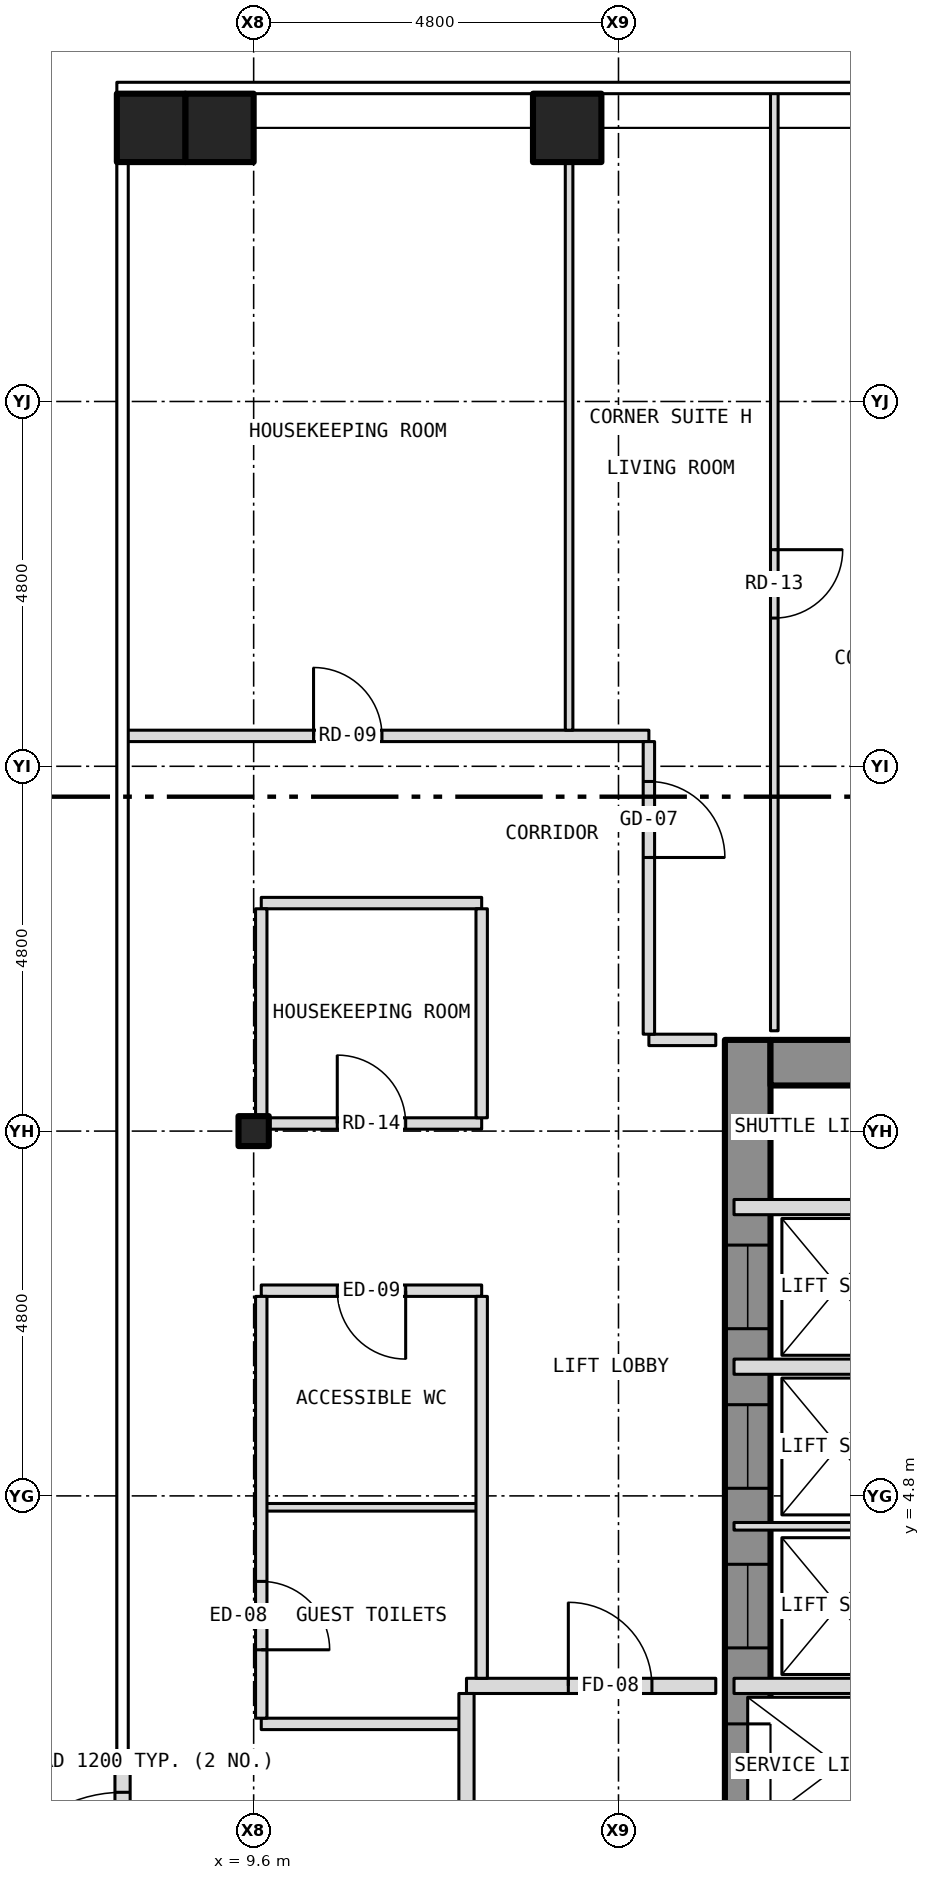
"""IFC4 building model, lengths in metres.
Left out: names, types, materials, properties, quantities, classifications, styles, units other than length and angle.
Written with IfcOpenShell. Run it as: python <this file> out.ifc"""

import sys

from ifc_helpers import new_model, si_unit, direction, frame, frame_2d, origin, origin_2d, place, context, subcontext, project, spatial, rectangle, hollow_rectangle, i_section, extrude, element, fill, save


model = new_model("IFC4")
c1 = context("Model", 3, precision=1e-05, world=origin(), true_north=direction((0.0, 1.0)))
c2 = subcontext(c1, "Body", "Model", "MODEL_VIEW")
j1 = project(units=[si_unit("LENGTHUNIT", "METRE"), si_unit("PLANEANGLEUNIT", "RADIAN")], contexts=[c1])
p1 = place(None, origin())
s1 = spatial("IfcSite", under=j1, at=p1, CompositionType="ELEMENT")
p2 = place(p1, origin())
s2 = spatial("IfcBuilding", under=s1, at=p2, CompositionType="ELEMENT")
p3 = place(p2, frame((0.0, 0.0, 131.0)))
s3 = spatial("IfcBuildingStorey", under=s2, at=p3, CompositionType="ELEMENT", Elevation=131.0)
for number, where, z_axis, x_axis in (
    (1, (9.15, 22.8, -0.15), (0.0, 0.0, 1.0), (1.0, 0.0, 0.0)),
    (2, (13.725, 22.8, -0.15), (0.0, 0.0, 1.0), (1.0, 0.0, 0.0)),
    (3, (8.25, 22.8, -0.15), (0.0, 0.0, 1.0), (1.0, 0.0, 0.0)),
):
    element("IfcColumn", number, at=place(p3, frame(where, z_axis=z_axis, x_axis=x_axis)), inside=s3, PredefinedType="COLUMN", context=c2, shape_type="SweptSolid", body=[
        extrude(hollow_rectangle(XDim=0.9, YDim=0.9, WallThickness=0.05, at=origin_2d()), origin(), (0.0, 0.0, 1.0), 3.5),
    ])
p4 = place(p3, frame((9.6, 9.6, -0.15), z_axis=(0.0, 0.0, 1.0), x_axis=(1.0, 0.0, 0.0)))
e4 = element("IfcColumn", 4, at=p4, inside=s3, PredefinedType="COLUMN", context=c2, shape_type="SweptSolid", body=[
    extrude(i_section(OverallWidth=0.399, OverallDepth=0.394, WebThickness=0.023, FlangeThickness=0.037, at=origin_2d()), origin(), (0.0, 0.0, 1.0), 3.5),
])
p5 = place(p3, frame((16.1, -10.8, 0.0), z_axis=(0.0, 0.0, 1.0), x_axis=(0.0, 1.0, 0.0)))
e5 = element("IfcWall", 5, at=p5, inside=s3, PredefinedType="SHEAR", context=c2, shape_type="SweptSolid", body=[
    extrude(rectangle(XDim=21.6, YDim=0.6, at=frame_2d((10.8, 0.0))), origin(), (0.0, 0.0, 1.0), 3.25),
])
p6 = place(p5, frame((9.4, 0.0, 0.0)))
e6 = element("IfcOpeningElement", 6, at=p6, cuts=e5, PredefinedType="OPENING", context=c2, shape_type="SweptSolid", body=[
    extrude(rectangle(XDim=1.1, YDim=2.1, at=frame_2d((0.55, 1.05))), frame((0.0, 0.312, 0.0), z_axis=(0.0, -1.0, 0.0), x_axis=(1.0, 0.0, 0.0)), (0.0, 0.0, 1.0), 0.624),
])
p7 = place(p5, frame((11.5, 0.0, 0.0)))
e7 = element("IfcOpeningElement", 7, at=p7, cuts=e5, PredefinedType="OPENING", context=c2, shape_type="SweptSolid", body=[
    extrude(rectangle(XDim=1.1, YDim=2.1, at=frame_2d((0.55, 1.05))), frame((0.0, 0.312, 0.0), z_axis=(0.0, -1.0, 0.0), x_axis=(1.0, 0.0, 0.0)), (0.0, 0.0, 1.0), 0.624),
])
p8 = place(p5, frame((13.6, 0.0, 0.0)))
e8 = element("IfcOpeningElement", 8, at=p8, cuts=e5, PredefinedType="OPENING", context=c2, shape_type="SweptSolid", body=[
    extrude(rectangle(XDim=1.1, YDim=2.1, at=frame_2d((0.55, 1.05))), frame((0.0, 0.312, 0.0), z_axis=(0.0, -1.0, 0.0), x_axis=(1.0, 0.0, 0.0)), (0.0, 0.0, 1.0), 0.624),
])
p9 = place(p5, frame((15.7, 0.0, 0.0)))
e9 = element("IfcOpeningElement", 9, at=p9, cuts=e5, PredefinedType="OPENING", context=c2, shape_type="SweptSolid", body=[
    extrude(rectangle(XDim=1.1, YDim=2.1, at=frame_2d((0.55, 1.05))), frame((0.0, 0.312, 0.0), z_axis=(0.0, -1.0, 0.0), x_axis=(1.0, 0.0, 0.0)), (0.0, 0.0, 1.0), 0.624),
])
p10 = place(p5, frame((17.8, 0.0, 0.0)))
e10 = element("IfcOpeningElement", 10, at=p10, cuts=e5, PredefinedType="OPENING", context=c2, shape_type="SweptSolid", body=[
    extrude(rectangle(XDim=1.1, YDim=2.1, at=frame_2d((0.55, 1.05))), frame((0.0, 0.312, 0.0), z_axis=(0.0, -1.0, 0.0), x_axis=(1.0, 0.0, 0.0)), (0.0, 0.0, 1.0), 0.624),
])
p11 = place(p5, frame((5.642, 0.0, 0.0)))
e11 = element("IfcOpeningElement", 11, at=p11, cuts=e5, PredefinedType="OPENING", context=c2, shape_type="SweptSolid", body=[
    extrude(rectangle(XDim=1.1, YDim=2.1, at=frame_2d((0.55, 1.05))), frame((0.0, 0.312, 0.0), z_axis=(0.0, -1.0, 0.0), x_axis=(1.0, 0.0, 0.0)), (0.0, 0.0, 1.0), 0.624),
])
p12 = place(p5, frame((7.5, 0.0, 0.0)))
e12 = element("IfcOpeningElement", 12, at=p12, cuts=e5, PredefinedType="OPENING", context=c2, shape_type="SweptSolid", body=[
    extrude(rectangle(XDim=1.1, YDim=2.1, at=frame_2d((0.55, 1.05))), frame((0.0, 0.312, 0.0), z_axis=(0.0, -1.0, 0.0), x_axis=(1.0, 0.0, 0.0)), (0.0, 0.0, 1.0), 0.624),
])
p13 = place(p3, frame((16.4, 10.5, 0.0), z_axis=(0.0, 0.0, 1.0), x_axis=(1.0, 0.0, 0.0)))
e13 = element("IfcWall", 13, at=p13, inside=s3, PredefinedType="SHEAR", context=c2, shape_type="SweptSolid", body=[
    extrude(rectangle(XDim=5.8, YDim=0.6, at=frame_2d((2.9, 0.0))), origin(), (0.0, 0.0, 1.0), 3.25),
])
p14 = place(p3, frame((7.875, -1.4, 0.0), z_axis=(0.0, 0.0, 1.0), x_axis=(0.0, 1.0, 0.0)))
e14 = element("IfcWall", 14, at=p14, inside=s3, PredefinedType="SOLIDWALL", context=c2, shape_type="SweptSolid", body=[
    extrude(rectangle(XDim=2.8, YDim=0.2, at=frame_2d((1.4, 0.0))), origin(), (0.0, 0.0, 1.0), 3.5),
])
p15 = place(p14, frame((0.5, 0.0, 0.0)))
e15 = element("IfcOpeningElement", 15, at=p15, cuts=e14, PredefinedType="OPENING", context=c2, shape_type="SweptSolid", body=[
    extrude(rectangle(XDim=1.8, YDim=2.1, at=frame_2d((0.9, 1.05))), frame((0.0, 0.112, 0.0), z_axis=(0.0, -1.0, 0.0), x_axis=(1.0, 0.0, 0.0)), (0.0, 0.0, 1.0), 0.224),
])
p16 = place(p3, frame((9.7, 1.8, 0.0), z_axis=(0.0, 0.0, 1.0), x_axis=(1.0, 0.0, 0.0)))
e16 = element("IfcWall", 16, at=p16, inside=s3, PredefinedType="PARTITIONING", context=c2, shape_type="SweptSolid", body=[
    extrude(rectangle(XDim=2.7, YDim=0.15, at=frame_2d((1.35, 0.0))), origin(), (0.0, 0.0, 1.0), 3.35),
])
p17 = place(p3, frame((12.4, 2.3, 0.0), z_axis=(0.0, 0.0, 1.0), x_axis=(1.0, 0.0, 0.0)))
e17 = element("IfcWall", 17, at=p17, inside=s3, PredefinedType="PARTITIONING", context=c2, shape_type="SweptSolid", body=[
    extrude(rectangle(XDim=3.28, YDim=0.2, at=frame_2d((1.64, 0.0))), origin(), (0.0, 0.0, 1.0), 3.35),
])
p18 = place(p17, frame((1.34, 0.0, 0.0)))
e18 = element("IfcOpeningElement", 18, at=p18, cuts=e17, PredefinedType="OPENING", context=c2, shape_type="SweptSolid", body=[
    extrude(rectangle(XDim=1.1, YDim=2.1, at=frame_2d((0.55, 1.05))), frame((0.0, 0.112, 0.0), z_axis=(0.0, -1.0, 0.0), x_axis=(1.0, 0.0, 0.0)), (0.0, 0.0, 1.0), 0.224),
])
p19 = place(p3, frame((15.92, 2.3, 0.0), z_axis=(0.0, 0.0, 1.0), x_axis=(1.0, 0.0, 0.0)))
e19 = element("IfcWall", 19, at=p19, inside=s3, PredefinedType="PARTITIONING", context=c2, shape_type="SweptSolid", body=[
    extrude(rectangle(XDim=2.88, YDim=0.2, at=frame_2d((1.44, 0.0))), origin(), (0.0, 0.0, 1.0), 3.25),
])
p20 = place(p3, frame((15.92, 4.4, 0.0), z_axis=(0.0, 0.0, 1.0), x_axis=(1.0, 0.0, 0.0)))
e20 = element("IfcWall", 20, at=p20, inside=s3, PredefinedType="PARTITIONING", context=c2, shape_type="SweptSolid", body=[
    extrude(rectangle(XDim=6.76, YDim=0.1, at=frame_2d((3.38, 0.0))), origin(), (0.0, 0.0, 1.0), 3.25),
])
p21 = place(p20, frame((4.43, 0.0, 0.0)))
e21 = element("IfcOpeningElement", 21, at=p21, cuts=e20, PredefinedType="OPENING", context=c2, shape_type="SweptSolid", body=[
    extrude(rectangle(XDim=0.9, YDim=2.1, at=frame_2d((0.45, 1.05))), frame((0.0, 0.062, 0.0), z_axis=(0.0, -1.0, 0.0), x_axis=(1.0, 0.0, 0.0)), (0.0, 0.0, 1.0), 0.124),
])
p22 = place(p3, frame((9.7, 4.65, 0.0), z_axis=(0.0, 0.0, 1.0), x_axis=(1.0, 0.0, 0.0)))
e22 = element("IfcWall", 22, at=p22, inside=s3, PredefinedType="PARTITIONING", context=c2, shape_type="SweptSolid", body=[
    extrude(rectangle(XDim=2.9, YDim=0.1, at=frame_2d((1.45, 0.0))), origin(), (0.0, 0.0, 1.0), 3.35),
])
p23 = place(p3, frame((15.92, 6.5, 0.0), z_axis=(0.0, 0.0, 1.0), x_axis=(1.0, 0.0, 0.0)))
e23 = element("IfcWall", 23, at=p23, inside=s3, PredefinedType="PARTITIONING", context=c2, shape_type="SweptSolid", body=[
    extrude(rectangle(XDim=2.88, YDim=0.2, at=frame_2d((1.44, 0.0))), origin(), (0.0, 0.0, 1.0), 3.25),
])
p24 = place(p3, frame((9.7, 7.5, 0.0), z_axis=(0.0, 0.0, 1.0), x_axis=(1.0, 0.0, 0.0)))
e24 = element("IfcWall", 24, at=p24, inside=s3, PredefinedType="PARTITIONING", context=c2, shape_type="SweptSolid", body=[
    extrude(rectangle(XDim=2.9, YDim=0.15, at=frame_2d((1.45, 0.0))), origin(), (0.0, 0.0, 1.0), 3.35),
])
p25 = place(p24, frame((1.0, 0.0, 0.0)))
e25 = element("IfcOpeningElement", 25, at=p25, cuts=e24, PredefinedType="OPENING", context=c2, shape_type="SweptSolid", body=[
    extrude(rectangle(XDim=0.9, YDim=2.1, at=frame_2d((0.45, 1.05))), frame((0.0, 0.087, 0.0), z_axis=(0.0, -1.0, 0.0), x_axis=(1.0, 0.0, 0.0)), (0.0, 0.0, 1.0), 0.174),
])
p26 = place(p3, frame((15.92, 8.6, 0.0), z_axis=(0.0, 0.0, 1.0), x_axis=(1.0, 0.0, 0.0)))
e26 = element("IfcWall", 26, at=p26, inside=s3, PredefinedType="PARTITIONING", context=c2, shape_type="SweptSolid", body=[
    extrude(rectangle(XDim=2.88, YDim=0.2, at=frame_2d((1.44, 0.0))), origin(), (0.0, 0.0, 1.0), 3.25),
])
p27 = place(p3, frame((9.7, 9.7, 0.0), z_axis=(0.0, 0.0, 1.0), x_axis=(1.0, 0.0, 0.0)))
e27 = element("IfcWall", 27, at=p27, inside=s3, PredefinedType="PARTITIONING", context=c2, shape_type="SweptSolid", body=[
    extrude(rectangle(XDim=2.9, YDim=0.15, at=frame_2d((1.45, 0.0))), origin(), (0.0, 0.0, 1.0), 2.728),
])
p28 = place(p27, frame((1.0, 0.0, 0.0)))
e28 = element("IfcOpeningElement", 28, at=p28, cuts=e27, PredefinedType="OPENING", context=c2, shape_type="SweptSolid", body=[
    extrude(rectangle(XDim=0.9, YDim=2.1, at=frame_2d((0.45, 1.05))), frame((0.0, 0.087, 0.0), z_axis=(0.0, -1.0, 0.0), x_axis=(1.0, 0.0, 0.0)), (0.0, 0.0, 1.0), 0.174),
])
p29 = place(p3, frame((14.8, 10.8, 0.0), z_axis=(0.0, 0.0, 1.0), x_axis=(1.0, 0.0, 0.0)))
e29 = element("IfcWall", 29, at=p29, inside=s3, PredefinedType="PARTITIONING", context=c2, shape_type="SweptSolid", body=[
    extrude(rectangle(XDim=0.88, YDim=0.15, at=frame_2d((0.44, 0.0))), origin(), (0.0, 0.0, 1.0), 3.35),
])
p30 = place(p3, frame((9.7, 12.6, 0.0), z_axis=(0.0, 0.0, 1.0), x_axis=(1.0, 0.0, 0.0)))
e30 = element("IfcWall", 30, at=p30, inside=s3, PredefinedType="PARTITIONING", context=c2, shape_type="SweptSolid", body=[
    extrude(rectangle(XDim=2.9, YDim=0.15, at=frame_2d((1.45, 0.0))), origin(), (0.0, 0.0, 1.0), 3.35),
])
p31 = place(p3, frame((7.92, 14.8, 0.0), z_axis=(0.0, 0.0, 1.0), x_axis=(1.0, 0.0, 0.0)))
e31 = element("IfcWall", 31, at=p31, inside=s3, PredefinedType="PARTITIONING", context=c2, shape_type="SweptSolid", body=[
    extrude(rectangle(XDim=6.88, YDim=0.15, at=frame_2d((3.44, 0.0))), origin(), (0.0, 0.0, 1.0), 3.35),
])
p32 = place(p31, frame((2.468, 0.0, 0.0)))
e32 = element("IfcOpeningElement", 32, at=p32, cuts=e31, PredefinedType="OPENING", context=c2, shape_type="SweptSolid", body=[
    extrude(rectangle(XDim=0.9, YDim=2.1, at=frame_2d((0.45, 1.05))), frame((0.0, 0.087, 0.0), z_axis=(0.0, -1.0, 0.0), x_axis=(1.0, 0.0, 0.0)), (0.0, 0.0, 1.0), 0.174),
])
p33 = place(p3, frame((9.7, 1.875, 0.0), z_axis=(0.0, 0.0, 1.0), x_axis=(0.0, 1.0, 0.0)))
e33 = element("IfcWall", 33, at=p33, inside=s3, PredefinedType="PARTITIONING", context=c2, shape_type="SweptSolid", body=[
    extrude(rectangle(XDim=5.55, YDim=0.15, at=frame_2d((2.775, 0.0))), origin(), (0.0, 0.0, 1.0), 2.728),
])
p34 = place(p33, frame((0.9, 0.0, 0.0)))
e34 = element("IfcOpeningElement", 34, at=p34, cuts=e33, PredefinedType="OPENING", context=c2, shape_type="SweptSolid", body=[
    extrude(rectangle(XDim=0.9, YDim=2.1, at=frame_2d((0.45, 1.05))), frame((0.0, 0.087, 0.0), z_axis=(0.0, -1.0, 0.0), x_axis=(1.0, 0.0, 0.0)), (0.0, 0.0, 1.0), 0.174),
])
p35 = place(p3, frame((9.7, 9.775, 0.0), z_axis=(0.0, 0.0, 1.0), x_axis=(0.0, 1.0, 0.0)))
e35 = element("IfcWall", 35, at=p35, inside=s3, PredefinedType="PARTITIONING", context=c2, shape_type="SweptSolid", body=[
    extrude(rectangle(XDim=2.75, YDim=0.15, at=frame_2d((1.375, 0.0))), origin(), (0.0, 0.0, 1.0), 2.728),
])
p36 = place(p3, frame((12.4, -1.8, 0.0), z_axis=(0.0, 0.0, 1.0), x_axis=(0.0, 1.0, 0.0)))
e36 = element("IfcWall", 36, at=p36, inside=s3, PredefinedType="PARTITIONING", context=c2, shape_type="SweptSolid", body=[
    extrude(rectangle(XDim=4.0, YDim=0.2, at=frame_2d((2.0, 0.0))), origin(), (0.0, 0.0, 1.0), 3.35),
])
p37 = place(p36, frame((1.25, 0.0, 0.0)))
e37 = element("IfcOpeningElement", 37, at=p37, cuts=e36, PredefinedType="OPENING", context=c2, shape_type="SweptSolid", body=[
    extrude(rectangle(XDim=1.1, YDim=2.1, at=frame_2d((0.55, 1.05))), frame((0.0, 0.112, 0.0), z_axis=(0.0, -1.0, 0.0), x_axis=(1.0, 0.0, 0.0)), (0.0, 0.0, 1.0), 0.224),
])
p38 = place(p3, frame((12.6, 2.4, 0.0), z_axis=(0.0, 0.0, 1.0), x_axis=(0.0, 1.0, 0.0)))
e38 = element("IfcWall", 38, at=p38, inside=s3, PredefinedType="PARTITIONING", context=c2, shape_type="SweptSolid", body=[
    extrude(rectangle(XDim=5.025, YDim=0.15, at=frame_2d((2.513, 0.0))), origin(), (0.0, 0.0, 1.0), 3.35),
])
p39 = place(p3, frame((12.6, 9.775, 0.0), z_axis=(0.0, 0.0, 1.0), x_axis=(0.0, 1.0, 0.0)))
e39 = element("IfcWall", 39, at=p39, inside=s3, PredefinedType="PARTITIONING", context=c2, shape_type="SweptSolid", body=[
    extrude(rectangle(XDim=2.75, YDim=0.15, at=frame_2d((1.375, 0.0))), origin(), (0.0, 0.0, 1.0), 3.35),
])
p40 = place(p3, frame((13.75, 14.875, 0.0), z_axis=(0.0, 0.0, 1.0), x_axis=(0.0, 1.0, 0.0)))
e40 = element("IfcWall", 40, at=p40, inside=s3, PredefinedType="PARTITIONING", context=c2, shape_type="SweptSolid", body=[
    extrude(rectangle(XDim=7.805, YDim=0.1, at=frame_2d((3.902, 0.0))), origin(), (0.0, 0.0, 1.0), 3.35),
])
p41 = place(p3, frame((14.8, 10.875, 0.0), z_axis=(0.0, 0.0, 1.0), x_axis=(0.0, 1.0, 0.0)))
e41 = element("IfcWall", 41, at=p41, inside=s3, PredefinedType="PARTITIONING", context=c2, shape_type="SweptSolid", body=[
    extrude(rectangle(XDim=3.85, YDim=0.15, at=frame_2d((1.925, 0.0))), origin(), (0.0, 0.0, 1.0), 3.35),
])
p42 = place(p41, frame((2.325, 0.0, 0.0)))
e42 = element("IfcOpeningElement", 42, at=p42, cuts=e41, PredefinedType="OPENING", context=c2, shape_type="SweptSolid", body=[
    extrude(rectangle(XDim=1.0, YDim=2.1, at=frame_2d((0.5, 1.05))), frame((0.0, 0.087, 0.0), z_axis=(0.0, -1.0, 0.0), x_axis=(1.0, 0.0, 0.0)), (0.0, 0.0, 1.0), 0.174),
])
p43 = place(p3, frame((16.45, 10.92, 0.0), z_axis=(0.0, 0.0, 1.0), x_axis=(0.0, 1.0, 0.0)))
e43 = element("IfcWall", 43, at=p43, inside=s3, PredefinedType="PARTITIONING", context=c2, shape_type="SweptSolid", body=[
    extrude(rectangle(XDim=12.36, YDim=0.1, at=frame_2d((6.18, 0.0))), origin(), (0.0, 0.0, 1.0), 3.35),
])
p44 = place(p43, frame((5.43, 0.0, 0.0)))
e44 = element("IfcOpeningElement", 44, at=p44, cuts=e43, PredefinedType="OPENING", context=c2, shape_type="SweptSolid", body=[
    extrude(rectangle(XDim=0.9, YDim=2.1, at=frame_2d((0.45, 1.05))), frame((0.0, 0.062, 0.0), z_axis=(0.0, -1.0, 0.0), x_axis=(1.0, 0.0, 0.0)), (0.0, 0.0, 1.0), 0.124),
])
p45 = place(p15, origin())
e45 = element("IfcDoor", 45, at=p45, inside=s3, OperationType="DOUBLE_DOOR_DOUBLE_SWING", PredefinedType="DOOR", context=c2, shape_type="SweptSolid", body=[
    extrude(rectangle(XDim=1.8, YDim=2.1, at=frame_2d((0.9, 1.05))), frame((0.0, 0.025, 0.0), z_axis=(0.0, -1.0, 0.0), x_axis=(1.0, 0.0, 0.0)), (0.0, 0.0, 1.0), 0.05),
])
fill(e15, e45)
p46 = place(p7, origin())
e46 = element("IfcDoor", 46, at=p46, inside=s3, OperationType="SLIDING_TO_LEFT", PredefinedType="DOOR", context=c2, shape_type="SweptSolid", body=[
    extrude(rectangle(XDim=1.1, YDim=2.1, at=frame_2d((0.55, 1.05))), frame((0.0, 0.025, 0.0), z_axis=(0.0, -1.0, 0.0), x_axis=(1.0, 0.0, 0.0)), (0.0, 0.0, 1.0), 0.05),
])
fill(e7, e46)
p47 = place(p8, origin())
e47 = element("IfcDoor", 47, at=p47, inside=s3, OperationType="SLIDING_TO_LEFT", PredefinedType="DOOR", context=c2, shape_type="SweptSolid", body=[
    extrude(rectangle(XDim=1.1, YDim=2.1, at=frame_2d((0.55, 1.05))), frame((0.0, 0.025, 0.0), z_axis=(0.0, -1.0, 0.0), x_axis=(1.0, 0.0, 0.0)), (0.0, 0.0, 1.0), 0.05),
])
fill(e8, e47)
p48 = place(p9, origin())
e48 = element("IfcDoor", 48, at=p48, inside=s3, OperationType="SLIDING_TO_LEFT", PredefinedType="DOOR", context=c2, shape_type="SweptSolid", body=[
    extrude(rectangle(XDim=1.1, YDim=2.1, at=frame_2d((0.55, 1.05))), frame((0.0, 0.025, 0.0), z_axis=(0.0, -1.0, 0.0), x_axis=(1.0, 0.0, 0.0)), (0.0, 0.0, 1.0), 0.05),
])
fill(e9, e48)
p49 = place(p10, origin())
e49 = element("IfcDoor", 49, at=p49, inside=s3, OperationType="SLIDING_TO_LEFT", PredefinedType="DOOR", context=c2, shape_type="SweptSolid", body=[
    extrude(rectangle(XDim=1.1, YDim=2.1, at=frame_2d((0.55, 1.05))), frame((0.0, 0.025, 0.0), z_axis=(0.0, -1.0, 0.0), x_axis=(1.0, 0.0, 0.0)), (0.0, 0.0, 1.0), 0.05),
])
fill(e10, e49)
p50 = place(p18, origin())
e50 = element("IfcDoor", 50, at=p50, inside=s3, OperationType="SINGLE_SWING_LEFT", PredefinedType="DOOR", context=c2, shape_type="SweptSolid", body=[
    extrude(rectangle(XDim=1.1, YDim=2.1, at=frame_2d((0.55, 1.05))), frame((0.0, 0.025, 0.0), z_axis=(0.0, -1.0, 0.0), x_axis=(1.0, 0.0, 0.0)), (0.0, 0.0, 1.0), 0.05),
])
fill(e18, e50)
p51 = place(p32, origin())
e51 = element("IfcDoor", 51, at=p51, inside=s3, OperationType="SINGLE_SWING_LEFT", PredefinedType="DOOR", context=c2, shape_type="SweptSolid", body=[
    extrude(rectangle(XDim=0.9, YDim=2.1, at=frame_2d((0.45, 1.05))), frame((0.0, 0.025, 0.0), z_axis=(0.0, -1.0, 0.0), x_axis=(1.0, 0.0, 0.0)), (0.0, 0.0, 1.0), 0.05),
])
fill(e32, e51)
p52 = place(p42, origin())
e52 = element("IfcDoor", 52, at=p52, inside=s3, OperationType="SINGLE_SWING_LEFT", PredefinedType="DOOR", context=c2, shape_type="SweptSolid", body=[
    extrude(rectangle(XDim=1.0, YDim=2.1, at=frame_2d((0.5, 1.05))), frame((0.0, 0.025, 0.0), z_axis=(0.0, -1.0, 0.0), x_axis=(1.0, 0.0, 0.0)), (0.0, 0.0, 1.0), 0.05),
])
fill(e42, e52)
p53 = place(p44, origin())
e53 = element("IfcDoor", 53, at=p53, inside=s3, OperationType="SINGLE_SWING_RIGHT", PredefinedType="DOOR", context=c2, shape_type="SweptSolid", body=[
    extrude(rectangle(XDim=0.9, YDim=2.1, at=frame_2d((0.45, 1.05))), frame((0.0, 0.025, 0.0), z_axis=(0.0, -1.0, 0.0), x_axis=(1.0, 0.0, 0.0)), (0.0, 0.0, 1.0), 0.05),
])
fill(e44, e53)
p54 = place(p28, origin())
e54 = element("IfcDoor", 54, at=p54, inside=s3, OperationType="SINGLE_SWING_LEFT", PredefinedType="DOOR", context=c2, shape_type="SweptSolid", body=[
    extrude(rectangle(XDim=0.9, YDim=2.1, at=frame_2d((0.45, 1.05))), frame((0.0, 0.025, 0.0), z_axis=(0.0, -1.0, 0.0), x_axis=(1.0, 0.0, 0.0)), (0.0, 0.0, 1.0), 0.05),
])
fill(e28, e54)
p55 = place(p34, origin())
e55 = element("IfcDoor", 55, at=p55, inside=s3, OperationType="SINGLE_SWING_LEFT", PredefinedType="DOOR", context=c2, shape_type="SweptSolid", body=[
    extrude(rectangle(XDim=0.9, YDim=2.1, at=frame_2d((0.45, 1.05))), frame((0.0, 0.025, 0.0), z_axis=(0.0, -1.0, 0.0), x_axis=(1.0, 0.0, 0.0)), (0.0, 0.0, 1.0), 0.05),
])
fill(e34, e55)
p56 = place(p25, origin())
e56 = element("IfcDoor", 56, at=p56, inside=s3, OperationType="SINGLE_SWING_RIGHT", PredefinedType="DOOR", context=c2, shape_type="SweptSolid", body=[
    extrude(rectangle(XDim=0.9, YDim=2.1, at=frame_2d((0.45, 1.05))), frame((0.0, 0.025, 0.0), z_axis=(0.0, -1.0, 0.0), x_axis=(1.0, 0.0, 0.0)), (0.0, 0.0, 1.0), 0.05),
])
fill(e25, e56)
save(model, sys.argv[1])
